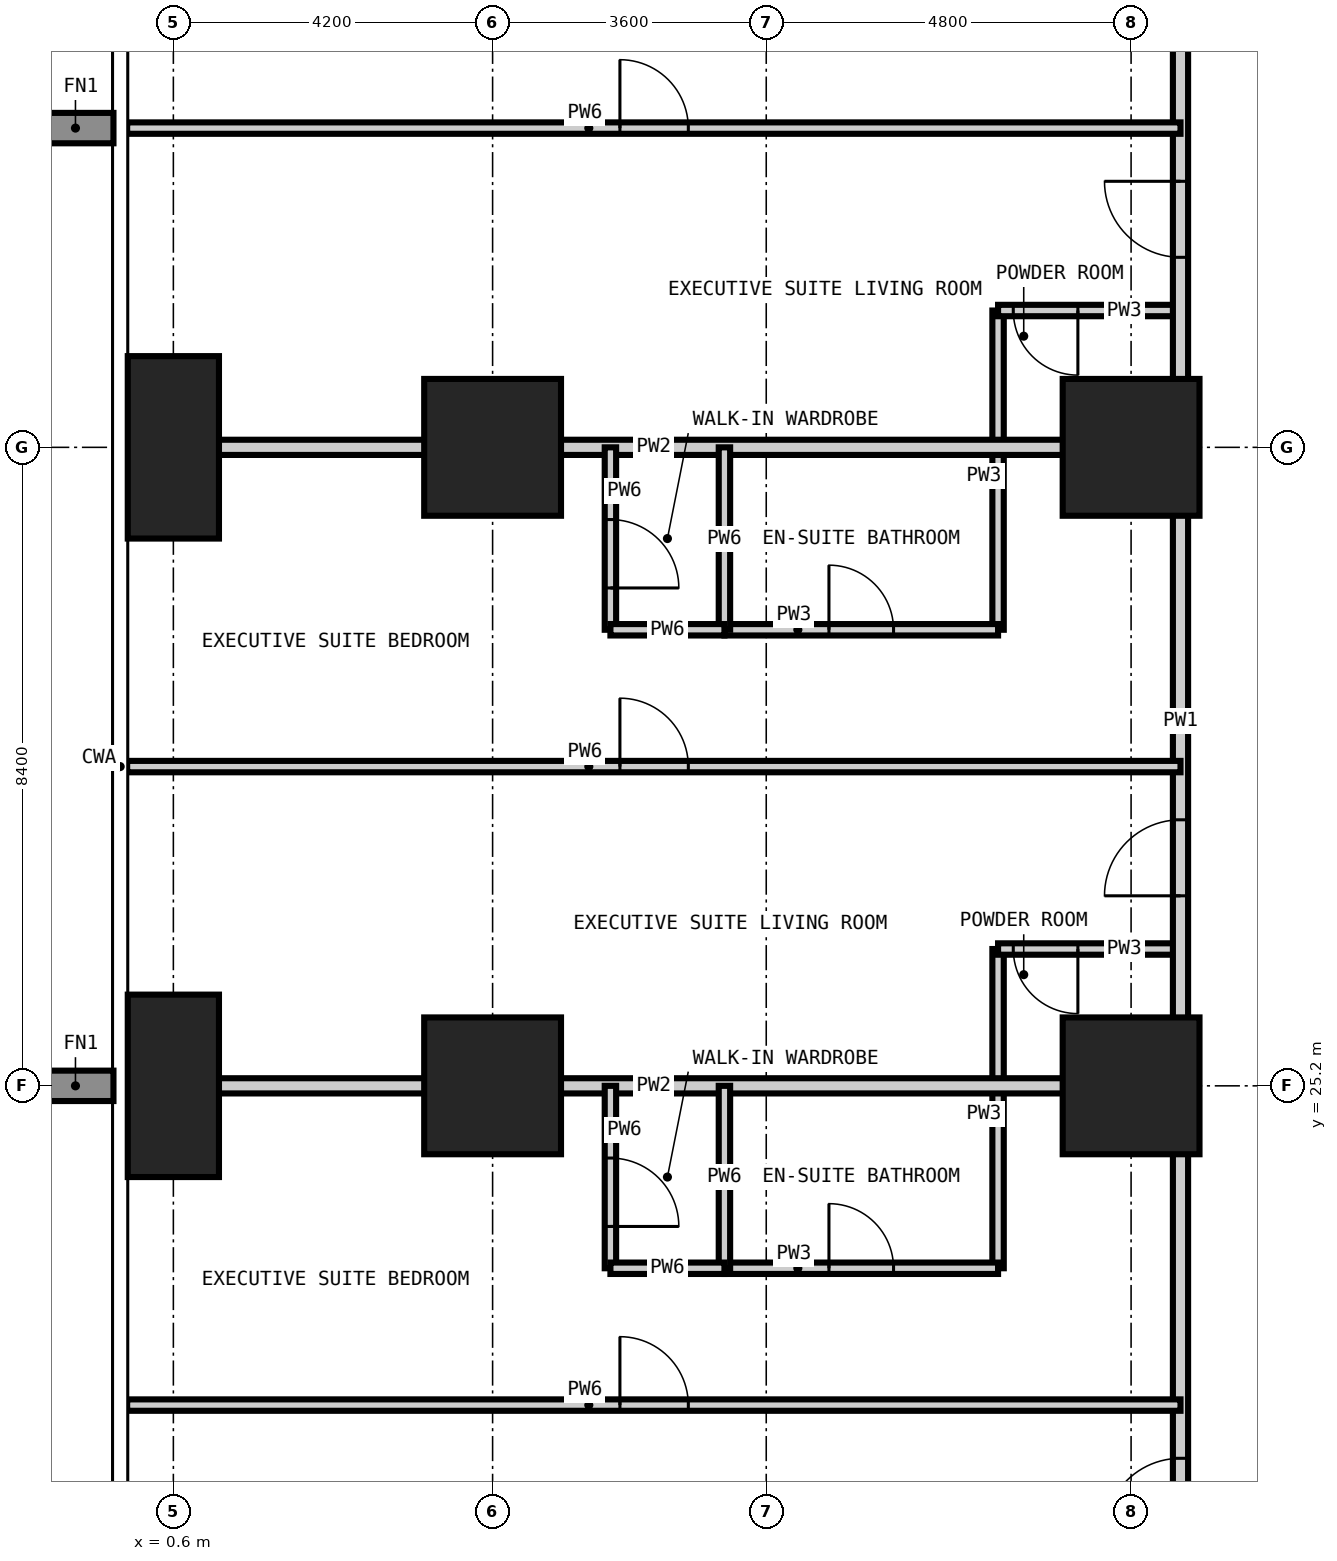
"""IFC4 building model, lengths in metres.
Left out: names, types, materials, properties, quantities, classifications, styles, units other than length and angle.
Written with IfcOpenShell. Run it as: python <this file> out.ifc"""

import sys

from ifc_helpers import new_model, si_unit, direction, frame, frame_2d, origin, origin_2d, place, context, subcontext, project, spatial, rectangle, extrude, element, fill, save


model = new_model("IFC4")
c1 = context("Model", 3, precision=1e-05, world=origin(), true_north=direction((0.0, 1.0)))
c2 = subcontext(c1, "Body", "Model", "MODEL_VIEW")
j1 = project(units=[si_unit("LENGTHUNIT", "METRE"), si_unit("PLANEANGLEUNIT", "RADIAN")], contexts=[c1])
p1 = place(None, origin())
s1 = spatial("IfcSite", under=j1, at=p1, CompositionType="ELEMENT")
p2 = place(p1, origin())
s2 = spatial("IfcBuilding", under=s1, at=p2, CompositionType="ELEMENT")
p3 = place(p2, frame((0.0, 0.0, 55.8)))
s3 = spatial("IfcBuildingStorey", under=s2, at=p3, CompositionType="ELEMENT", Elevation=55.8)
for number, where, z_axis, x_axis in (
    (1, (0.6, 25.2, -0.35), (0.0, 0.0, 1.0), (1.0, 0.0, 0.0)),
    (2, (0.6, 33.6, -0.35), (0.0, 0.0, 1.0), (1.0, 0.0, 0.0)),
):
    element("IfcColumn", number, at=place(p3, frame(where, z_axis=z_axis, x_axis=x_axis)), inside=s3, PredefinedType="COLUMN", context=c2, shape_type="SweptSolid", body=[
        extrude(rectangle(XDim=1.2, YDim=2.4, at=origin_2d()), origin(), (0.0, 0.0, 1.0), 3.6),
    ])
for number, where, z_axis, x_axis in (
    (3, (4.8, 25.2, -0.35), (0.0, 0.0, 1.0), (1.0, 0.0, 0.0)),
    (4, (4.8, 33.6, -0.35), (0.0, 0.0, 1.0), (1.0, 0.0, 0.0)),
    (5, (13.2, 25.2, -0.35), (0.0, 0.0, 1.0), (1.0, 0.0, 0.0)),
    (6, (13.2, 33.6, -0.35), (0.0, 0.0, 1.0), (1.0, 0.0, 0.0)),
):
    element("IfcColumn", number, at=place(p3, frame(where, z_axis=z_axis, x_axis=x_axis)), inside=s3, PredefinedType="COLUMN", context=c2, shape_type="SweptSolid", body=[
        extrude(rectangle(XDim=1.8, YDim=1.8, at=origin_2d()), origin(), (0.0, 0.0, 1.0), 3.6),
    ])
for number, where, z_axis, x_axis in (
    (7, (11.45, 22.8, 0.0), (0.0, 0.0, 1.0), (0.0, 1.0, 0.0)),
    (8, (11.45, 31.2, 0.0), (0.0, 0.0, 1.0), (0.0, 1.0, 0.0)),
):
    element("IfcWall", number, at=place(p3, frame(where, z_axis=z_axis, x_axis=x_axis)), inside=s3, PredefinedType="PARTITIONING", context=c2, shape_type="SweptSolid", body=[
        extrude(rectangle(XDim=4.2, YDim=0.15, at=frame_2d((2.1, 0.0))), origin(), (0.0, 0.0, 1.0), 3.25),
    ])
p4 = place(p3, frame((7.85, 22.8, 0.0), z_axis=(0.0, 0.0, 1.0), x_axis=(1.0, 0.0, 0.0)))
e9 = element("IfcWall", 9, at=p4, inside=s3, PredefinedType="PARTITIONING", context=c2, shape_type="SweptSolid", body=[
    extrude(rectangle(XDim=3.6, YDim=0.15, at=frame_2d((1.8, 0.0))), origin(), (0.0, 0.0, 1.0), 3.25),
])
p5 = place(p4, frame((1.375, 0.0, 0.0)))
e10 = element("IfcOpeningElement", 10, at=p5, cuts=e9, PredefinedType="OPENING", context=c2, shape_type="SweptSolid", body=[
    extrude(rectangle(XDim=0.85, YDim=2.1, at=frame_2d((0.425, 1.05))), frame((0.0, 0.085, 0.0), z_axis=(0.0, -1.0, 0.0), x_axis=(1.0, 0.0, 0.0)), (0.0, 0.0, 1.0), 0.17),
])
p6 = place(p3, frame((11.45, 27.0, 0.0), z_axis=(0.0, 0.0, 1.0), x_axis=(1.0, 0.0, 0.0)))
e11 = element("IfcWall", 11, at=p6, inside=s3, PredefinedType="PARTITIONING", context=c2, shape_type="SweptSolid", body=[
    extrude(rectangle(XDim=2.4, YDim=0.15, at=frame_2d((1.2, 0.0))), origin(), (0.0, 0.0, 1.0), 3.25),
])
p7 = place(p6, frame((0.2, 0.0, 0.0)))
e12 = element("IfcOpeningElement", 12, at=p7, cuts=e11, PredefinedType="OPENING", context=c2, shape_type="SweptSolid", body=[
    extrude(rectangle(XDim=0.85, YDim=2.1, at=frame_2d((0.425, 1.05))), frame((0.0, 0.085, 0.0), z_axis=(0.0, -1.0, 0.0), x_axis=(1.0, 0.0, 0.0)), (0.0, 0.0, 1.0), 0.17),
])
p8 = place(p3, frame((7.85, 31.2, 0.0), z_axis=(0.0, 0.0, 1.0), x_axis=(1.0, 0.0, 0.0)))
e13 = element("IfcWall", 13, at=p8, inside=s3, PredefinedType="PARTITIONING", context=c2, shape_type="SweptSolid", body=[
    extrude(rectangle(XDim=3.6, YDim=0.15, at=frame_2d((1.8, 0.0))), origin(), (0.0, 0.0, 1.0), 3.25),
])
p9 = place(p8, frame((1.375, 0.0, 0.0)))
e14 = element("IfcOpeningElement", 14, at=p9, cuts=e13, PredefinedType="OPENING", context=c2, shape_type="SweptSolid", body=[
    extrude(rectangle(XDim=0.85, YDim=2.1, at=frame_2d((0.425, 1.05))), frame((0.0, 0.085, 0.0), z_axis=(0.0, -1.0, 0.0), x_axis=(1.0, 0.0, 0.0)), (0.0, 0.0, 1.0), 0.17),
])
p10 = place(p3, frame((11.45, 35.4, 0.0), z_axis=(0.0, 0.0, 1.0), x_axis=(1.0, 0.0, 0.0)))
e15 = element("IfcWall", 15, at=p10, inside=s3, PredefinedType="PARTITIONING", context=c2, shape_type="SweptSolid", body=[
    extrude(rectangle(XDim=2.4, YDim=0.15, at=frame_2d((1.2, 0.0))), origin(), (0.0, 0.0, 1.0), 3.25),
])
p11 = place(p10, frame((0.2, 0.0, 0.0)))
e16 = element("IfcOpeningElement", 16, at=p11, cuts=e15, PredefinedType="OPENING", context=c2, shape_type="SweptSolid", body=[
    extrude(rectangle(XDim=0.85, YDim=2.1, at=frame_2d((0.425, 1.05))), frame((0.0, 0.085, 0.0), z_axis=(0.0, -1.0, 0.0), x_axis=(1.0, 0.0, 0.0)), (0.0, 0.0, 1.0), 0.17),
])
p12 = place(p3, frame((13.85, 13.85, 0.0), z_axis=(0.0, 0.0, 1.0), x_axis=(0.0, 1.0, 0.0)))
e17 = element("IfcWall", 17, at=p12, inside=s3, PredefinedType="PARTITIONING", context=c2, shape_type="SweptSolid", body=[
    extrude(rectangle(XDim=32.3, YDim=0.2, at=frame_2d((16.15, 0.0))), origin(), (0.0, 0.0, 1.0), 3.25),
])
p13 = place(p12, frame((5.45, 0.0, 0.0)))
e18 = element("IfcOpeningElement", 18, at=p13, cuts=e17, PredefinedType="OPENING", context=c2, shape_type="SweptSolid", body=[
    extrude(rectangle(XDim=1.0, YDim=2.2, at=frame_2d((0.5, 1.1))), frame((0.0, 0.11, 0.0), z_axis=(0.0, -1.0, 0.0), x_axis=(1.0, 0.0, 0.0)), (0.0, 0.0, 1.0), 0.22),
])
p14 = place(p12, frame((13.85, 0.0, 0.0)))
e19 = element("IfcOpeningElement", 19, at=p14, cuts=e17, PredefinedType="OPENING", context=c2, shape_type="SweptSolid", body=[
    extrude(rectangle(XDim=1.0, YDim=2.2, at=frame_2d((0.5, 1.1))), frame((0.0, 0.11, 0.0), z_axis=(0.0, -1.0, 0.0), x_axis=(1.0, 0.0, 0.0)), (0.0, 0.0, 1.0), 0.22),
])
p15 = place(p12, frame((22.25, 0.0, 0.0)))
e20 = element("IfcOpeningElement", 20, at=p15, cuts=e17, PredefinedType="OPENING", context=c2, shape_type="SweptSolid", body=[
    extrude(rectangle(XDim=1.0, YDim=2.2, at=frame_2d((0.5, 1.1))), frame((0.0, 0.11, 0.0), z_axis=(0.0, -1.0, 0.0), x_axis=(1.0, 0.0, 0.0)), (0.0, 0.0, 1.0), 0.22),
])
p16 = place(p12, frame((0.975, 0.0, 0.0)))
e21 = element("IfcOpeningElement", 21, at=p16, cuts=e17, PredefinedType="OPENING", context=c2, shape_type="SweptSolid", body=[
    extrude(rectangle(XDim=1.0, YDim=2.2, at=frame_2d((0.5, 1.1))), frame((0.0, 0.11, 0.0), z_axis=(0.0, -1.0, 0.0), x_axis=(1.0, 0.0, 0.0)), (0.0, 0.0, 1.0), 0.22),
])
p17 = place(p12, frame((29.725, 0.0, 0.0)))
e22 = element("IfcOpeningElement", 22, at=p17, cuts=e17, PredefinedType="OPENING", context=c2, shape_type="SweptSolid", body=[
    extrude(rectangle(XDim=1.0, YDim=2.2, at=frame_2d((0.5, 1.1))), frame((0.0, 0.11, 0.0), z_axis=(0.0, -1.0, 0.0), x_axis=(1.0, 0.0, 0.0)), (0.0, 0.0, 1.0), 0.22),
])
for number, where, z_axis, x_axis in (
    (23, (-0.008, 25.2, 0.0), (0.0, 0.0, 1.0), (1.0, 0.0, 0.0)),
    (24, (-0.008, 33.6, 0.0), (0.0, 0.0, 1.0), (1.0, 0.0, 0.0)),
):
    element("IfcWall", number, at=place(p3, frame(where, z_axis=z_axis, x_axis=x_axis)), inside=s3, PredefinedType="PARTITIONING", context=c2, shape_type="SweptSolid", body=[
        extrude(rectangle(XDim=13.858, YDim=0.2, at=frame_2d((6.929, 0.0))), origin(), (0.0, 0.0, 1.0), 3.25),
    ])
p18 = place(p3, frame((6.35, 22.8, 0.0), z_axis=(0.0, 0.0, 1.0), x_axis=(0.0, 1.0, 0.0)))
e25 = element("IfcWall", 25, at=p18, inside=s3, PredefinedType="PARTITIONING", context=c2, shape_type="SweptSolid", body=[
    extrude(rectangle(XDim=2.4, YDim=0.15, at=frame_2d((1.2, 0.0))), origin(), (0.0, 0.0, 1.0), 3.25),
])
p19 = place(p18, frame((0.55, 0.0, 0.0)))
e26 = element("IfcOpeningElement", 26, at=p19, cuts=e25, PredefinedType="OPENING", context=c2, shape_type="SweptSolid", body=[
    extrude(rectangle(XDim=0.9, YDim=2.1, at=frame_2d((0.45, 1.05))), frame((0.0, 0.085, 0.0), z_axis=(0.0, -1.0, 0.0), x_axis=(1.0, 0.0, 0.0)), (0.0, 0.0, 1.0), 0.17),
])
p20 = place(p3, frame((6.35, 31.2, 0.0), z_axis=(0.0, 0.0, 1.0), x_axis=(0.0, 1.0, 0.0)))
e27 = element("IfcWall", 27, at=p20, inside=s3, PredefinedType="PARTITIONING", context=c2, shape_type="SweptSolid", body=[
    extrude(rectangle(XDim=2.4, YDim=0.15, at=frame_2d((1.2, 0.0))), origin(), (0.0, 0.0, 1.0), 3.25),
])
p21 = place(p20, frame((0.55, 0.0, 0.0)))
e28 = element("IfcOpeningElement", 28, at=p21, cuts=e27, PredefinedType="OPENING", context=c2, shape_type="SweptSolid", body=[
    extrude(rectangle(XDim=0.9, YDim=2.1, at=frame_2d((0.45, 1.05))), frame((0.0, 0.085, 0.0), z_axis=(0.0, -1.0, 0.0), x_axis=(1.0, 0.0, 0.0)), (0.0, 0.0, 1.0), 0.17),
])
p22 = place(p3, frame((7.85, 22.8, 0.0), z_axis=(0.0, 0.0, 1.0), x_axis=(0.0, 1.0, 0.0)))
e29 = element("IfcWall", 29, at=p22, inside=s3, PredefinedType="PARTITIONING", context=c2, shape_type="SweptSolid", body=[
    extrude(rectangle(XDim=2.4, YDim=0.15, at=frame_2d((1.2, 0.0))), origin(), (0.0, 0.0, 1.0), 3.25),
])
p23 = place(p3, frame((7.85, 31.2, 0.0), z_axis=(0.0, 0.0, 1.0), x_axis=(0.0, 1.0, 0.0)))
e30 = element("IfcWall", 30, at=p23, inside=s3, PredefinedType="PARTITIONING", context=c2, shape_type="SweptSolid", body=[
    extrude(rectangle(XDim=2.4, YDim=0.15, at=frame_2d((1.2, 0.0))), origin(), (0.0, 0.0, 1.0), 3.25),
])
p24 = place(p3, frame((-0.008, 21.0, 0.0), z_axis=(0.0, 0.0, 1.0), x_axis=(1.0, 0.0, 0.0)))
e31 = element("IfcWall", 31, at=p24, inside=s3, PredefinedType="PARTITIONING", context=c2, shape_type="SweptSolid", body=[
    extrude(rectangle(XDim=13.858, YDim=0.15, at=frame_2d((6.929, 0.0))), origin(), (0.0, 0.0, 1.0), 3.25),
])
p25 = place(p24, frame((6.483, 0.0, 0.0)))
e32 = element("IfcOpeningElement", 32, at=p25, cuts=e31, PredefinedType="OPENING", context=c2, shape_type="SweptSolid", body=[
    extrude(rectangle(XDim=0.9, YDim=2.1, at=frame_2d((0.45, 1.05))), frame((0.0, 0.085, 0.0), z_axis=(0.0, -1.0, 0.0), x_axis=(1.0, 0.0, 0.0)), (0.0, 0.0, 1.0), 0.17),
])
p26 = place(p3, frame((6.35, 22.8, 0.0), z_axis=(0.0, 0.0, 1.0), x_axis=(1.0, 0.0, 0.0)))
e33 = element("IfcWall", 33, at=p26, inside=s3, PredefinedType="PARTITIONING", context=c2, shape_type="SweptSolid", body=[
    extrude(rectangle(XDim=1.5, YDim=0.15, at=frame_2d((0.75, 0.0))), origin(), (0.0, 0.0, 1.0), 3.25),
])
p27 = place(p3, frame((-0.008, 29.4, 0.0), z_axis=(0.0, 0.0, 1.0), x_axis=(1.0, 0.0, 0.0)))
e34 = element("IfcWall", 34, at=p27, inside=s3, PredefinedType="PARTITIONING", context=c2, shape_type="SweptSolid", body=[
    extrude(rectangle(XDim=13.858, YDim=0.15, at=frame_2d((6.929, 0.0))), origin(), (0.0, 0.0, 1.0), 3.25),
])
p28 = place(p27, frame((6.483, 0.0, 0.0)))
e35 = element("IfcOpeningElement", 35, at=p28, cuts=e34, PredefinedType="OPENING", context=c2, shape_type="SweptSolid", body=[
    extrude(rectangle(XDim=0.9, YDim=2.1, at=frame_2d((0.45, 1.05))), frame((0.0, 0.085, 0.0), z_axis=(0.0, -1.0, 0.0), x_axis=(1.0, 0.0, 0.0)), (0.0, 0.0, 1.0), 0.17),
])
p29 = place(p3, frame((6.35, 31.2, 0.0), z_axis=(0.0, 0.0, 1.0), x_axis=(1.0, 0.0, 0.0)))
e36 = element("IfcWall", 36, at=p29, inside=s3, PredefinedType="PARTITIONING", context=c2, shape_type="SweptSolid", body=[
    extrude(rectangle(XDim=1.5, YDim=0.15, at=frame_2d((0.75, 0.0))), origin(), (0.0, 0.0, 1.0), 3.25),
])
p30 = place(p3, frame((-0.008, 37.8, 0.0), z_axis=(0.0, 0.0, 1.0), x_axis=(1.0, 0.0, 0.0)))
e37 = element("IfcWall", 37, at=p30, inside=s3, PredefinedType="PARTITIONING", context=c2, shape_type="SweptSolid", body=[
    extrude(rectangle(XDim=13.858, YDim=0.15, at=frame_2d((6.929, 0.0))), origin(), (0.0, 0.0, 1.0), 3.25),
])
p31 = place(p30, frame((6.483, 0.0, 0.0)))
e38 = element("IfcOpeningElement", 38, at=p31, cuts=e37, PredefinedType="OPENING", context=c2, shape_type="SweptSolid", body=[
    extrude(rectangle(XDim=0.9, YDim=2.1, at=frame_2d((0.45, 1.05))), frame((0.0, 0.085, 0.0), z_axis=(0.0, -1.0, 0.0), x_axis=(1.0, 0.0, 0.0)), (0.0, 0.0, 1.0), 0.17),
])
p32 = place(p13, origin())
e39 = element("IfcDoor", 39, at=p32, inside=s3, OperationType="SINGLE_SWING_LEFT", PredefinedType="DOOR", context=c2, shape_type="SweptSolid", body=[
    extrude(rectangle(XDim=1.0, YDim=2.2, at=frame_2d((0.5, 1.1))), frame((0.0, 0.025, 0.0), z_axis=(0.0, -1.0, 0.0), x_axis=(1.0, 0.0, 0.0)), (0.0, 0.0, 1.0), 0.05),
])
fill(e18, e39)
p33 = place(p25, origin())
e40 = element("IfcDoor", 40, at=p33, inside=s3, OperationType="SINGLE_SWING_LEFT", PredefinedType="DOOR", context=c2, shape_type="SweptSolid", body=[
    extrude(rectangle(XDim=0.9, YDim=2.1, at=frame_2d((0.45, 1.05))), frame((0.0, 0.025, 0.0), z_axis=(0.0, -1.0, 0.0), x_axis=(1.0, 0.0, 0.0)), (0.0, 0.0, 1.0), 0.05),
])
fill(e32, e40)
p34 = place(p5, origin())
e41 = element("IfcDoor", 41, at=p34, inside=s3, OperationType="SINGLE_SWING_LEFT", PredefinedType="DOOR", context=c2, shape_type="SweptSolid", body=[
    extrude(rectangle(XDim=0.85, YDim=2.1, at=frame_2d((0.425, 1.05))), frame((0.0, 0.025, 0.0), z_axis=(0.0, -1.0, 0.0), x_axis=(1.0, 0.0, 0.0)), (0.0, 0.0, 1.0), 0.05),
])
fill(e10, e41)
p35 = place(p19, frame((0.9, 0.0, 0.0), z_axis=(0.0, 0.0, 1.0), x_axis=(-1.0, 0.0, 0.0)))
e42 = element("IfcDoor", 42, at=p35, inside=s3, OperationType="SINGLE_SWING_RIGHT", PredefinedType="DOOR", context=c2, shape_type="SweptSolid", body=[
    extrude(rectangle(XDim=0.9, YDim=2.1, at=frame_2d((0.45, 1.05))), frame((0.0, 0.025, 0.0), z_axis=(0.0, -1.0, 0.0), x_axis=(1.0, 0.0, 0.0)), (0.0, 0.0, 1.0), 0.05),
])
fill(e26, e42)
p36 = place(p14, origin())
e43 = element("IfcDoor", 43, at=p36, inside=s3, OperationType="SINGLE_SWING_LEFT", PredefinedType="DOOR", context=c2, shape_type="SweptSolid", body=[
    extrude(rectangle(XDim=1.0, YDim=2.2, at=frame_2d((0.5, 1.1))), frame((0.0, 0.025, 0.0), z_axis=(0.0, -1.0, 0.0), x_axis=(1.0, 0.0, 0.0)), (0.0, 0.0, 1.0), 0.05),
])
fill(e19, e43)
p37 = place(p7, frame((0.85, 0.0, 0.0), z_axis=(0.0, 0.0, 1.0), x_axis=(-1.0, 0.0, 0.0)))
e44 = element("IfcDoor", 44, at=p37, inside=s3, OperationType="SINGLE_SWING_LEFT", PredefinedType="DOOR", context=c2, shape_type="SweptSolid", body=[
    extrude(rectangle(XDim=0.85, YDim=2.1, at=frame_2d((0.425, 1.05))), frame((0.0, 0.025, 0.0), z_axis=(0.0, -1.0, 0.0), x_axis=(1.0, 0.0, 0.0)), (0.0, 0.0, 1.0), 0.05),
])
fill(e12, e44)
p38 = place(p28, origin())
e45 = element("IfcDoor", 45, at=p38, inside=s3, OperationType="SINGLE_SWING_LEFT", PredefinedType="DOOR", context=c2, shape_type="SweptSolid", body=[
    extrude(rectangle(XDim=0.9, YDim=2.1, at=frame_2d((0.45, 1.05))), frame((0.0, 0.025, 0.0), z_axis=(0.0, -1.0, 0.0), x_axis=(1.0, 0.0, 0.0)), (0.0, 0.0, 1.0), 0.05),
])
fill(e35, e45)
p39 = place(p9, origin())
e46 = element("IfcDoor", 46, at=p39, inside=s3, OperationType="SINGLE_SWING_LEFT", PredefinedType="DOOR", context=c2, shape_type="SweptSolid", body=[
    extrude(rectangle(XDim=0.85, YDim=2.1, at=frame_2d((0.425, 1.05))), frame((0.0, 0.025, 0.0), z_axis=(0.0, -1.0, 0.0), x_axis=(1.0, 0.0, 0.0)), (0.0, 0.0, 1.0), 0.05),
])
fill(e14, e46)
p40 = place(p21, frame((0.9, 0.0, 0.0), z_axis=(0.0, 0.0, 1.0), x_axis=(-1.0, 0.0, 0.0)))
e47 = element("IfcDoor", 47, at=p40, inside=s3, OperationType="SINGLE_SWING_RIGHT", PredefinedType="DOOR", context=c2, shape_type="SweptSolid", body=[
    extrude(rectangle(XDim=0.9, YDim=2.1, at=frame_2d((0.45, 1.05))), frame((0.0, 0.025, 0.0), z_axis=(0.0, -1.0, 0.0), x_axis=(1.0, 0.0, 0.0)), (0.0, 0.0, 1.0), 0.05),
])
fill(e28, e47)
p41 = place(p15, origin())
e48 = element("IfcDoor", 48, at=p41, inside=s3, OperationType="SINGLE_SWING_RIGHT", PredefinedType="DOOR", context=c2, shape_type="SweptSolid", body=[
    extrude(rectangle(XDim=1.0, YDim=2.2, at=frame_2d((0.5, 1.1))), frame((0.0, 0.025, 0.0), z_axis=(0.0, -1.0, 0.0), x_axis=(1.0, 0.0, 0.0)), (0.0, 0.0, 1.0), 0.05),
])
fill(e20, e48)
p42 = place(p11, frame((0.85, 0.0, 0.0), z_axis=(0.0, 0.0, 1.0), x_axis=(-1.0, 0.0, 0.0)))
e49 = element("IfcDoor", 49, at=p42, inside=s3, OperationType="SINGLE_SWING_LEFT", PredefinedType="DOOR", context=c2, shape_type="SweptSolid", body=[
    extrude(rectangle(XDim=0.85, YDim=2.1, at=frame_2d((0.425, 1.05))), frame((0.0, 0.025, 0.0), z_axis=(0.0, -1.0, 0.0), x_axis=(1.0, 0.0, 0.0)), (0.0, 0.0, 1.0), 0.05),
])
fill(e16, e49)
p43 = place(p31, origin())
e50 = element("IfcDoor", 50, at=p43, inside=s3, OperationType="SINGLE_SWING_LEFT", PredefinedType="DOOR", context=c2, shape_type="SweptSolid", body=[
    extrude(rectangle(XDim=0.9, YDim=2.1, at=frame_2d((0.45, 1.05))), frame((0.0, 0.025, 0.0), z_axis=(0.0, -1.0, 0.0), x_axis=(1.0, 0.0, 0.0)), (0.0, 0.0, 1.0), 0.05),
])
fill(e38, e50)
save(model, sys.argv[1])
